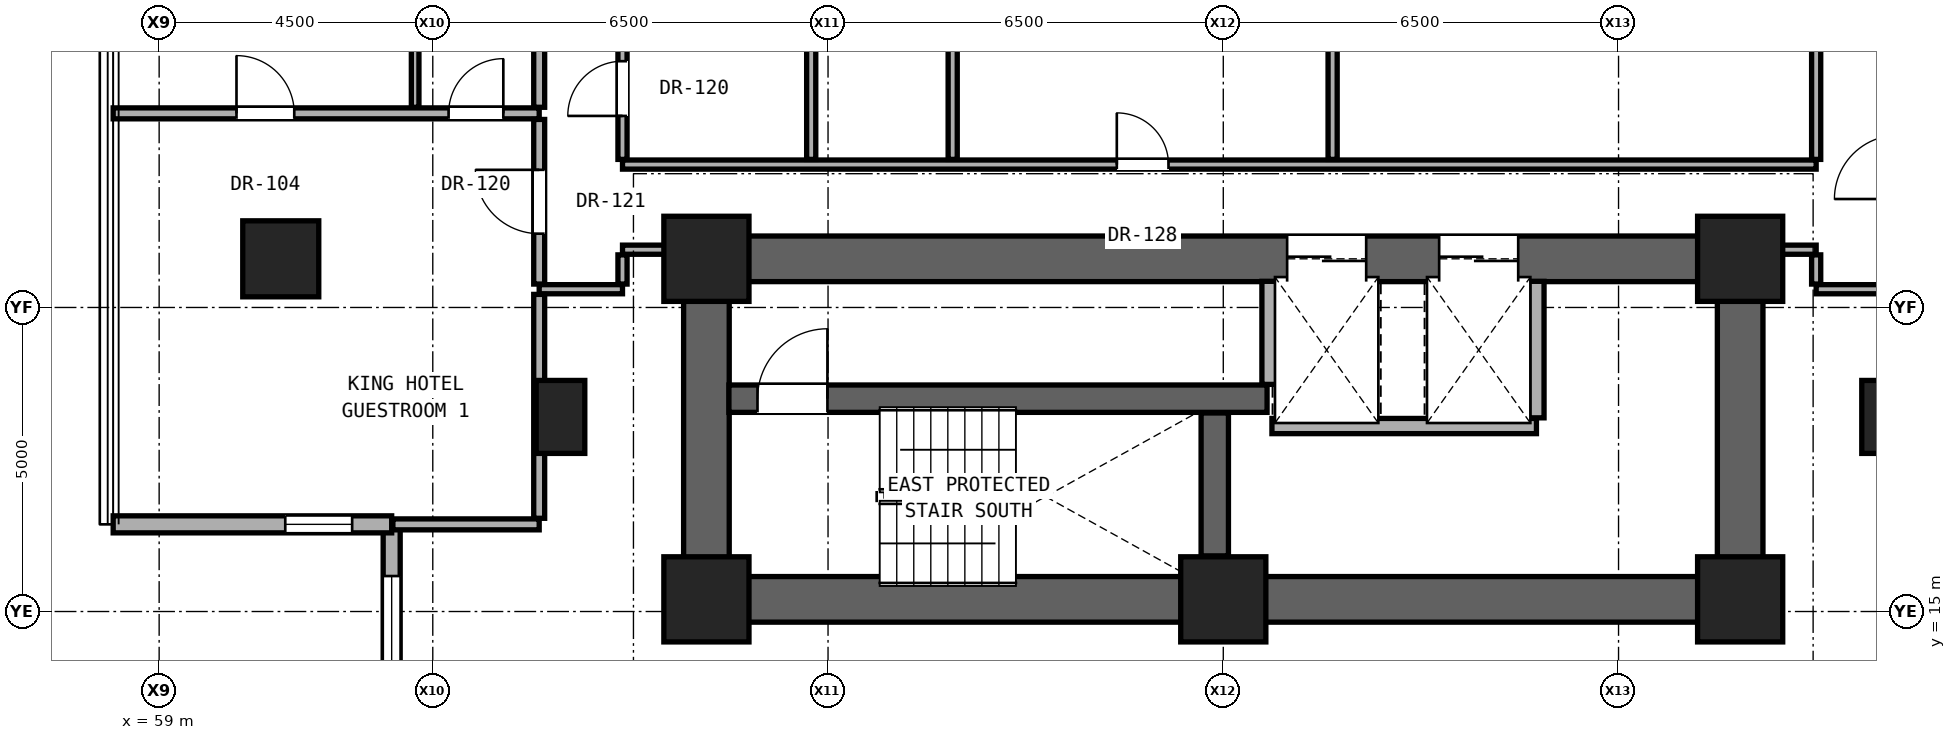
"""IFC4 building model, lengths in metres.
Left out: names, types, materials, properties, quantities, classifications, styles, units other than length and angle.
Written with IfcOpenShell. Run it as: python <this file> out.ifc"""

import sys

from ifc_helpers import new_model, si_unit, direction, frame, frame_2d, origin, origin_2d, place, context, subcontext, project, spatial, rectangle, hollow_rectangle, extrude, element, fill, save


model = new_model("IFC4")
c1 = context("Model", 3, precision=1e-05, world=origin(), true_north=direction((0.0, 1.0)))
c2 = subcontext(c1, "Body", "Model", "MODEL_VIEW")
j1 = project(units=[si_unit("LENGTHUNIT", "METRE"), si_unit("PLANEANGLEUNIT", "RADIAN")], contexts=[c1])
p1 = place(None, origin())
s1 = spatial("IfcSite", under=j1, at=p1, CompositionType="ELEMENT")
p2 = place(p1, origin())
s2 = spatial("IfcBuilding", under=s1, at=p2, CompositionType="ELEMENT")
p3 = place(p2, frame((0.0, 0.0, 29.0)))
s3 = spatial("IfcBuildingStorey", under=s2, at=p3, CompositionType="ELEMENT", Elevation=29.0)
for number, where, z_axis, x_axis in (
    (1, (68.0, 15.2, 0.0), (0.0, 0.0, 1.0), (1.0, 0.0, 0.0)),
    (2, (76.5, 15.2, 0.0), (0.0, 0.0, 1.0), (1.0, 0.0, 0.0)),
    (3, (85.0, 15.2, 0.0), (0.0, 0.0, 1.0), (1.0, 0.0, 0.0)),
    (4, (68.0, 20.8, 0.0), (0.0, 0.0, 1.0), (1.0, 0.0, 0.0)),
    (5, (85.0, 20.8, 0.0), (0.0, 0.0, 1.0), (1.0, 0.0, 0.0)),
):
    element("IfcColumn", number, at=place(p3, frame(where, z_axis=z_axis, x_axis=x_axis)), inside=s3, PredefinedType="COLUMN", context=c2, shape_type="SweptSolid", body=[
        extrude(rectangle(XDim=1.4, YDim=1.4, at=origin_2d()), origin(), (0.0, 0.0, 1.0), 3.3),
    ])
p4 = place(p3, frame((61.0, 20.8, 0.0), z_axis=(0.0, 0.0, 1.0), x_axis=(1.0, 0.0, 0.0)))
e6 = element("IfcColumn", 6, at=p4, inside=s3, PredefinedType="COLUMN", context=c2, shape_type="SweptSolid", body=[
    extrude(hollow_rectangle(XDim=1.25, YDim=1.25, WallThickness=0.07, at=origin_2d()), origin(), (0.0, 0.0, 1.0), 3.3),
])
for number, where, z_axis, x_axis in (
    (7, (65.6, 18.2, 0.0), (0.0, 0.0, 1.0), (1.0, 0.0, 0.0)),
    (8, (87.4, 18.2, 0.0), (0.0, 0.0, 1.0), (1.0, 0.0, 0.0)),
):
    element("IfcColumn", number, at=place(p3, frame(where, z_axis=z_axis, x_axis=x_axis)), inside=s3, PredefinedType="PILASTER", context=c2, shape_type="SweptSolid", body=[
        extrude(rectangle(XDim=0.8, YDim=1.2, at=origin_2d()), origin(), (0.0, 0.0, 1.0), 3.3),
    ])
p5 = place(p3, frame((68.0, 15.2, 0.0), z_axis=(0.0, 0.0, 1.0), x_axis=(1.0, 0.0, 0.0)))
e9 = element("IfcWall", 9, at=p5, inside=s3, PredefinedType="SHEAR", context=c2, shape_type="SweptSolid", body=[
    extrude(rectangle(XDim=17.0, YDim=0.75, at=frame_2d((8.5, 0.0))), origin(), (0.0, 0.0, 1.0), 3.06),
])
for number, where, z_axis, x_axis in (
    (10, (68.0, 15.2, 0.0), (0.0, 0.0, 1.0), (0.0, 1.0, 0.0)),
    (11, (85.0, 15.2, 0.0), (0.0, 0.0, 1.0), (0.0, 1.0, 0.0)),
):
    element("IfcWall", number, at=place(p3, frame(where, z_axis=z_axis, x_axis=x_axis)), inside=s3, PredefinedType="SHEAR", context=c2, shape_type="SweptSolid", body=[
        extrude(rectangle(XDim=5.6, YDim=0.75, at=frame_2d((2.8, 0.0))), origin(), (0.0, 0.0, 1.0), 3.06),
    ])
p6 = place(p3, frame((68.0, 20.8, 0.0), z_axis=(0.0, 0.0, 1.0), x_axis=(1.0, 0.0, 0.0)))
e12 = element("IfcWall", 12, at=p6, inside=s3, PredefinedType="SHEAR", context=c2, shape_type="SweptSolid", body=[
    extrude(rectangle(XDim=17.0, YDim=0.75, at=frame_2d((8.5, 0.0))), origin(), (0.0, 0.0, 1.0), 3.06),
])
p7 = place(p6, frame((9.55, 0.0, 0.0)))
e13 = element("IfcOpeningElement", 13, at=p7, cuts=e12, PredefinedType="OPENING", context=c2, shape_type="SweptSolid", body=[
    extrude(rectangle(XDim=1.3, YDim=2.3, at=frame_2d((0.65, 1.15))), frame((0.0, 0.385, 0.0), z_axis=(0.0, -1.0, 0.0), x_axis=(1.0, 0.0, 0.0)), (0.0, 0.0, 1.0), 0.77),
])
p8 = place(p6, frame((12.05, 0.0, 0.0)))
e14 = element("IfcOpeningElement", 14, at=p8, cuts=e12, PredefinedType="OPENING", context=c2, shape_type="SweptSolid", body=[
    extrude(rectangle(XDim=1.3, YDim=2.3, at=frame_2d((0.65, 1.15))), frame((0.0, 0.385, 0.0), z_axis=(0.0, -1.0, 0.0), x_axis=(1.0, 0.0, 0.0)), (0.0, 0.0, 1.0), 0.77),
])
p9 = place(p3, frame((62.824, 16.433, 0.0), z_axis=(0.0, 0.0, 1.0), x_axis=(0.0, -1.0, 0.0)))
e15 = element("IfcWall", 15, at=p9, inside=s3, PredefinedType="SOLIDWALL", context=c2, shape_type="SweptSolid", body=[
    extrude(rectangle(XDim=4.58, YDim=0.28, at=frame_2d((2.29, 0.0))), origin(), (0.0, 0.0, 1.0), 3.04),
])
p10 = place(p9, frame((0.85, 0.0, 0.79)))
e16 = element("IfcOpeningElement", 16, at=p10, cuts=e15, PredefinedType="OPENING", context=c2, shape_type="SweptSolid", body=[
    extrude(rectangle(XDim=1.5, YDim=2.1, at=frame_2d((0.75, 1.05))), frame((0.0, 0.15, 0.0), z_axis=(0.0, -1.0, 0.0), x_axis=(1.0, 0.0, 0.0)), (0.0, 0.0, 1.0), 0.3),
])
p11 = place(p3, frame((58.244, 16.433, 0.0), z_axis=(0.0, 0.0, 1.0), x_axis=(1.0, 0.0, 0.0)))
e17 = element("IfcWall", 17, at=p11, inside=s3, PredefinedType="SOLIDWALL", context=c2, shape_type="SweptSolid", body=[
    extrude(rectangle(XDim=4.58, YDim=0.28, at=frame_2d((2.29, 0.0))), origin(), (0.0, 0.0, 1.0), 3.04),
])
p12 = place(p11, frame((2.83, 0.0, 0.85)))
e18 = element("IfcOpeningElement", 18, at=p12, cuts=e17, PredefinedType="OPENING", context=c2, shape_type="SweptSolid", body=[
    extrude(rectangle(XDim=1.1, YDim=2.0, at=frame_2d((0.55, 1.0))), frame((0.0, 0.15, 0.0), z_axis=(0.0, -1.0, 0.0), x_axis=(1.0, 0.0, 0.0)), (0.0, 0.0, 1.0), 0.3),
])
p13 = place(p3, frame((62.844, 16.433, 0.0), z_axis=(0.0, 0.0, 1.0), x_axis=(1.0, 0.0, 0.0)))
e19 = element("IfcWall", 19, at=p13, inside=s3, PredefinedType="PARTITIONING", context=c2, shape_type="SweptSolid", body=[
    extrude(rectangle(XDim=2.406, YDim=0.18, at=frame_2d((1.203, 0.0))), origin(), (0.0, 0.0, 1.0), 3.06),
])
p14 = place(p3, frame((77.3, 18.05, 0.0), z_axis=(0.0, 0.0, 1.0), x_axis=(1.0, 0.0, 0.0)))
e20 = element("IfcWall", 20, at=p14, inside=s3, PredefinedType="SOLIDWALL", context=c2, shape_type="SweptSolid", body=[
    extrude(rectangle(XDim=4.35, YDim=0.25, at=frame_2d((2.175, 0.0))), origin(), (0.0, 0.0, 1.0), 3.06),
])
p15 = place(p3, frame((68.37, 18.5, 0.0), z_axis=(0.0, 0.0, 1.0), x_axis=(1.0, 0.0, 0.0)))
e21 = element("IfcWall", 21, at=p15, inside=s3, PredefinedType="SHEAR", context=c2, shape_type="SweptSolid", body=[
    extrude(rectangle(XDim=8.85, YDim=0.45, at=frame_2d((4.425, 0.0))), origin(), (0.0, 0.0, 1.0), 3.06),
])
p16 = place(p15, frame((0.47, 0.0, 0.0)))
e22 = element("IfcOpeningElement", 22, at=p16, cuts=e21, PredefinedType="OPENING", context=c2, shape_type="SweptSolid", body=[
    extrude(rectangle(XDim=1.15, YDim=2.2, at=frame_2d((0.575, 1.1))), frame((0.0, 0.235, 0.0), z_axis=(0.0, -1.0, 0.0), x_axis=(1.0, 0.0, 0.0)), (0.0, 0.0, 1.0), 0.47),
])
p17 = place(p3, frame((65.25, 20.3, 0.0), z_axis=(0.0, 0.0, 1.0), x_axis=(1.0, 0.0, 0.0)))
e23 = element("IfcWall", 23, at=p17, inside=s3, PredefinedType="PARTITIONING", context=c2, shape_type="SweptSolid", body=[
    extrude(rectangle(XDim=1.37, YDim=0.15, at=frame_2d((0.685, 0.0))), origin(), (0.0, 0.0, 1.0), 3.06),
])
p18 = place(p3, frame((86.25, 20.3, 0.0), z_axis=(0.0, 0.0, 1.0), x_axis=(1.0, 0.0, 0.0)))
e24 = element("IfcWall", 24, at=p18, inside=s3, PredefinedType="PARTITIONING", context=c2, shape_type="SweptSolid", body=[
    extrude(rectangle(XDim=1.35, YDim=0.15, at=frame_2d((0.675, 0.0))), origin(), (0.0, 0.0, 1.0), 3.06),
])
p19 = place(p3, frame((66.62, 20.95, 0.0), z_axis=(0.0, 0.0, 1.0), x_axis=(1.0, 0.0, 0.0)))
e25 = element("IfcWall", 25, at=p19, inside=s3, PredefinedType="PARTITIONING", context=c2, shape_type="SweptSolid", body=[
    extrude(rectangle(XDim=1.01, YDim=0.15, at=frame_2d((0.505, 0.0))), origin(), (0.0, 0.0, 1.0), 2.452),
])
p20 = place(p3, frame((85.37, 20.95, 0.0), z_axis=(0.0, 0.0, 1.0), x_axis=(1.0, 0.0, 0.0)))
e26 = element("IfcWall", 26, at=p20, inside=s3, PredefinedType="PARTITIONING", context=c2, shape_type="SweptSolid", body=[
    extrude(rectangle(XDim=0.88, YDim=0.15, at=frame_2d((0.44, 0.0))), origin(), (0.0, 0.0, 1.0), 2.452),
])
p21 = place(p3, frame((66.62, 22.35, 0.0), z_axis=(0.0, 0.0, 1.0), x_axis=(1.0, 0.0, 0.0)))
e27 = element("IfcWall", 27, at=p21, inside=s3, PredefinedType="PARTITIONING", context=c2, shape_type="SweptSolid", body=[
    extrude(rectangle(XDim=19.63, YDim=0.15, at=frame_2d((9.815, 0.0))), origin(), (0.0, 0.0, 1.0), 2.125),
])
p22 = place(p21, frame((8.129, 0.0, 0.0)))
e28 = element("IfcOpeningElement", 28, at=p22, cuts=e27, PredefinedType="OPENING", context=c2, shape_type="SweptSolid", body=[
    extrude(rectangle(XDim=0.85, YDim=2.01, at=frame_2d((0.425, 1.005))), frame((0.0, 0.085, 0.0), z_axis=(0.0, -1.0, 0.0), x_axis=(1.0, 0.0, 0.0)), (0.0, 0.0, 1.0), 0.17),
])
p23 = place(p3, frame((58.244, 23.192, 0.0), z_axis=(0.0, 0.0, 1.0), x_axis=(1.0, 0.0, 0.0)))
e29 = element("IfcWall", 29, at=p23, inside=s3, PredefinedType="PARTITIONING", context=c2, shape_type="SweptSolid", body=[
    extrude(rectangle(XDim=7.006, YDim=0.18, at=frame_2d((3.503, 0.0))), origin(), (0.0, 0.0, 1.0), 2.196),
])
p24 = place(p23, frame((2.028, 0.0, 0.0)))
e30 = element("IfcOpeningElement", 30, at=p24, cuts=e29, PredefinedType="OPENING", context=c2, shape_type="SweptSolid", body=[
    extrude(rectangle(XDim=0.95, YDim=2.15, at=frame_2d((0.475, 1.075))), frame((0.0, 0.1, 0.0), z_axis=(0.0, -1.0, 0.0), x_axis=(1.0, 0.0, 0.0)), (0.0, 0.0, 1.0), 0.2),
])
p25 = place(p23, frame((5.516, 0.0, 0.0)))
e31 = element("IfcOpeningElement", 31, at=p25, cuts=e29, PredefinedType="OPENING", context=c2, shape_type="SweptSolid", body=[
    extrude(rectangle(XDim=0.9, YDim=2.1, at=frame_2d((0.45, 1.05))), frame((0.0, 0.1, 0.0), z_axis=(0.0, -1.0, 0.0), x_axis=(1.0, 0.0, 0.0)), (0.0, 0.0, 1.0), 0.2),
])
p26 = place(p3, frame((63.21, 23.292, 0.0), z_axis=(0.0, 0.0, 1.0), x_axis=(0.0, 1.0, 0.0)))
e32 = element("IfcWall", 32, at=p26, inside=s3, PredefinedType="PARTITIONING", context=c2, shape_type="SweptSolid", body=[
    extrude(rectangle(XDim=2.127, YDim=0.125, at=frame_2d((1.064, 0.0))), origin(), (0.0, 0.0, 1.0), 3.06),
])
p27 = place(p3, frame((65.25, 16.533, 0.0), z_axis=(0.0, 0.0, 1.0), x_axis=(0.0, 1.0, 0.0)))
e33 = element("IfcWall", 33, at=p27, inside=s3, PredefinedType="PARTITIONING", context=c2, shape_type="SweptSolid", body=[
    extrude(rectangle(XDim=3.682, YDim=0.18, at=frame_2d((1.841, 0.0))), origin(), (0.0, 0.0, 1.0), 2.436),
])
p28 = place(p3, frame((65.25, 20.385, 0.0), z_axis=(0.0, 0.0, 1.0), x_axis=(0.0, 1.0, 0.0)))
e34 = element("IfcWall", 34, at=p28, inside=s3, PredefinedType="PARTITIONING", context=c2, shape_type="SweptSolid", body=[
    extrude(rectangle(XDim=2.707, YDim=0.18, at=frame_2d((1.354, 0.0))), origin(), (0.0, 0.0, 1.0), 2.452),
])
p29 = place(p28, frame((0.829, 0.0, 0.0)))
e35 = element("IfcOpeningElement", 35, at=p29, cuts=e34, PredefinedType="OPENING", context=c2, shape_type="SweptSolid", body=[
    extrude(rectangle(XDim=1.05, YDim=2.2, at=frame_2d((0.525, 1.1))), frame((0.0, 0.1, 0.0), z_axis=(0.0, -1.0, 0.0), x_axis=(1.0, 0.0, 0.0)), (0.0, 0.0, 1.0), 0.2),
])
p30 = place(p3, frame((65.25, 23.292, 0.0), z_axis=(0.0, 0.0, 1.0), x_axis=(0.0, 1.0, 0.0)))
e36 = element("IfcWall", 36, at=p30, inside=s3, PredefinedType="PARTITIONING", context=c2, shape_type="SweptSolid", body=[
    extrude(rectangle(XDim=2.127, YDim=0.18, at=frame_2d((1.064, 0.0))), origin(), (0.0, 0.0, 1.0), 3.06),
])
p31 = place(p3, frame((66.62, 20.385, 0.0), z_axis=(0.0, 0.0, 1.0), x_axis=(0.0, 1.0, 0.0)))
e37 = element("IfcWall", 37, at=p31, inside=s3, PredefinedType="PARTITIONING", context=c2, shape_type="SweptSolid", body=[
    extrude(rectangle(XDim=0.48, YDim=0.15, at=frame_2d((0.24, 0.0))), origin(), (0.0, 0.0, 1.0), 2.452),
])
p32 = place(p3, frame((66.62, 22.435, 0.0), z_axis=(0.0, 0.0, 1.0), x_axis=(0.0, 1.0, 0.0)))
e38 = element("IfcWall", 38, at=p32, inside=s3, PredefinedType="PARTITIONING", context=c2, shape_type="SweptSolid", body=[
    extrude(rectangle(XDim=2.33, YDim=0.15, at=frame_2d((1.165, 0.0))), origin(), (0.0, 0.0, 1.0), 3.06),
])
p33 = place(p32, frame((0.715, 0.0, 0.0)))
e39 = element("IfcOpeningElement", 39, at=p33, cuts=e38, PredefinedType="OPENING", context=c2, shape_type="SweptSolid", body=[
    extrude(rectangle(XDim=0.9, YDim=2.1, at=frame_2d((0.45, 1.05))), frame((0.0, 0.085, 0.0), z_axis=(0.0, -1.0, 0.0), x_axis=(1.0, 0.0, 0.0)), (0.0, 0.0, 1.0), 0.17),
])
p34 = place(p3, frame((69.723, 22.435, 0.0), z_axis=(0.0, 0.0, 1.0), x_axis=(0.0, 1.0, 0.0)))
e40 = element("IfcWall", 40, at=p34, inside=s3, PredefinedType="PARTITIONING", context=c2, shape_type="SweptSolid", body=[
    extrude(rectangle(XDim=2.33, YDim=0.15, at=frame_2d((1.165, 0.0))), origin(), (0.0, 0.0, 1.0), 3.06),
])
p35 = place(p3, frame((72.05, 22.435, 0.0), z_axis=(0.0, 0.0, 1.0), x_axis=(0.0, 1.0, 0.0)))
e41 = element("IfcWall", 41, at=p35, inside=s3, PredefinedType="PARTITIONING", context=c2, shape_type="SweptSolid", body=[
    extrude(rectangle(XDim=8.13, YDim=0.15, at=frame_2d((4.065, 0.0))), origin(), (0.0, 0.0, 1.0), 2.125),
])
p36 = place(p3, frame((76.36, 15.915, 0.0), z_axis=(0.0, 0.0, 1.0), x_axis=(0.0, 1.0, 0.0)))
e42 = element("IfcWall", 42, at=p36, inside=s3, PredefinedType="SHEAR", context=c2, shape_type="SweptSolid", body=[
    extrude(rectangle(XDim=2.35, YDim=0.45, at=frame_2d((1.175, 0.0))), origin(), (0.0, 0.0, 1.0), 3.06),
])
p37 = place(p3, frame((77.26, 18.735, 0.0), z_axis=(0.0, 0.0, 1.0), x_axis=(0.0, 1.0, 0.0)))
e43 = element("IfcWall", 43, at=p37, inside=s3, PredefinedType="SOLIDWALL", context=c2, shape_type="SweptSolid", body=[
    extrude(rectangle(XDim=1.695, YDim=0.25, at=frame_2d((0.847, 0.0))), origin(), (0.0, 0.0, 1.0), 3.06),
])
p38 = place(p3, frame((78.298, 22.435, 0.0), z_axis=(0.0, 0.0, 1.0), x_axis=(0.0, 1.0, 0.0)))
e44 = element("IfcWall", 44, at=p38, inside=s3, PredefinedType="PARTITIONING", context=c2, shape_type="SweptSolid", body=[
    extrude(rectangle(XDim=8.13, YDim=0.15, at=frame_2d((4.065, 0.0))), origin(), (0.0, 0.0, 1.0), 2.125),
])
p39 = place(p3, frame((81.65, 18.185, 0.0), z_axis=(0.0, 0.0, 1.0), x_axis=(0.0, 1.0, 0.0)))
e45 = element("IfcWall", 45, at=p39, inside=s3, PredefinedType="SOLIDWALL", context=c2, shape_type="SweptSolid", body=[
    extrude(rectangle(XDim=2.245, YDim=0.25, at=frame_2d((1.123, 0.0))), origin(), (0.0, 0.0, 1.0), 3.06),
])
p40 = place(p3, frame((86.25, 20.385, 0.0), z_axis=(0.0, 0.0, 1.0), x_axis=(0.0, 1.0, 0.0)))
e46 = element("IfcWall", 46, at=p40, inside=s3, PredefinedType="PARTITIONING", context=c2, shape_type="SweptSolid", body=[
    extrude(rectangle(XDim=0.48, YDim=0.15, at=frame_2d((0.24, 0.0))), origin(), (0.0, 0.0, 1.0), 2.452),
])
p41 = place(p3, frame((86.25, 22.435, 0.0), z_axis=(0.0, 0.0, 1.0), x_axis=(0.0, 1.0, 0.0)))
e47 = element("IfcWall", 47, at=p41, inside=s3, PredefinedType="PARTITIONING", context=c2, shape_type="SweptSolid", body=[
    extrude(rectangle(XDim=8.13, YDim=0.15, at=frame_2d((4.065, 0.0))), origin(), (0.0, 0.0, 1.0), 2.279),
])
p42 = place(p10, origin())
e48 = element("IfcWindow", 48, at=p42, inside=s3, PartitioningType="SINGLE_PANEL", PredefinedType="WINDOW", context=c2, shape_type="SweptSolid", body=[
    extrude(rectangle(XDim=1.5, YDim=2.1, at=frame_2d((0.75, 1.05))), frame((0.0, 0.03, 0.0), z_axis=(0.0, -1.0, 0.0), x_axis=(1.0, 0.0, 0.0)), (0.0, 0.0, 1.0), 0.06),
])
fill(e16, e48)
p43 = place(p12, origin())
e49 = element("IfcWindow", 49, at=p43, inside=s3, PartitioningType="SINGLE_PANEL", PredefinedType="WINDOW", context=c2, shape_type="SweptSolid", body=[
    extrude(rectangle(XDim=1.1, YDim=2.0, at=frame_2d((0.55, 1.0))), frame((0.0, 0.03, 0.0), z_axis=(0.0, -1.0, 0.0), x_axis=(1.0, 0.0, 0.0)), (0.0, 0.0, 1.0), 0.06),
])
fill(e18, e49)
p44 = place(p16, origin())
e50 = element("IfcDoor", 50, at=p44, inside=s3, OperationType="SINGLE_SWING_RIGHT", PredefinedType="DOOR", context=c2, shape_type="SweptSolid", body=[
    extrude(rectangle(XDim=1.15, YDim=2.2, at=frame_2d((0.575, 1.1))), frame((0.0, 0.025, 0.0), z_axis=(0.0, -1.0, 0.0), x_axis=(1.0, 0.0, 0.0)), (0.0, 0.0, 1.0), 0.05),
])
fill(e22, e50)
p45 = place(p33, origin())
e51 = element("IfcDoor", 51, at=p45, inside=s3, OperationType="SINGLE_SWING_LEFT", PredefinedType="DOOR", context=c2, shape_type="SweptSolid", body=[
    extrude(rectangle(XDim=0.9, YDim=2.1, at=frame_2d((0.45, 1.05))), frame((0.0, 0.025, 0.0), z_axis=(0.0, -1.0, 0.0), x_axis=(1.0, 0.0, 0.0)), (0.0, 0.0, 1.0), 0.05),
])
fill(e39, e51)
p46 = place(p29, origin())
e52 = element("IfcDoor", 52, at=p46, inside=s3, OperationType="SINGLE_SWING_RIGHT", PredefinedType="DOOR", context=c2, shape_type="SweptSolid", body=[
    extrude(rectangle(XDim=1.05, YDim=2.2, at=frame_2d((0.525, 1.1))), frame((0.0, 0.025, 0.0), z_axis=(0.0, -1.0, 0.0), x_axis=(1.0, 0.0, 0.0)), (0.0, 0.0, 1.0), 0.05),
])
fill(e35, e52)
p47 = place(p24, origin())
e53 = element("IfcDoor", 53, at=p47, inside=s3, OperationType="SINGLE_SWING_LEFT", PredefinedType="DOOR", context=c2, shape_type="SweptSolid", body=[
    extrude(rectangle(XDim=0.95, YDim=2.15, at=frame_2d((0.475, 1.075))), frame((0.0, 0.025, 0.0), z_axis=(0.0, -1.0, 0.0), x_axis=(1.0, 0.0, 0.0)), (0.0, 0.0, 1.0), 0.05),
])
fill(e30, e53)
p48 = place(p25, origin())
e54 = element("IfcDoor", 54, at=p48, inside=s3, OperationType="SINGLE_SWING_RIGHT", PredefinedType="DOOR", context=c2, shape_type="SweptSolid", body=[
    extrude(rectangle(XDim=0.9, YDim=2.1, at=frame_2d((0.45, 1.05))), frame((0.0, 0.025, 0.0), z_axis=(0.0, -1.0, 0.0), x_axis=(1.0, 0.0, 0.0)), (0.0, 0.0, 1.0), 0.05),
])
fill(e31, e54)
p49 = place(p22, origin())
e55 = element("IfcDoor", 55, at=p49, inside=s3, OperationType="SINGLE_SWING_LEFT", PredefinedType="DOOR", context=c2, shape_type="SweptSolid", body=[
    extrude(rectangle(XDim=0.85, YDim=2.01, at=frame_2d((0.425, 1.005))), frame((0.0, 0.025, 0.0), z_axis=(0.0, -1.0, 0.0), x_axis=(1.0, 0.0, 0.0)), (0.0, 0.0, 1.0), 0.05),
])
fill(e28, e55)
p50 = place(p7, origin())
e56 = element("IfcDoor", 56, at=p50, inside=s3, OperationType="DOUBLE_DOOR_SLIDING", PredefinedType="DOOR", context=c2, shape_type="SweptSolid", body=[
    extrude(rectangle(XDim=1.3, YDim=2.3, at=frame_2d((0.65, 1.15))), frame((0.0, 0.025, 0.0), z_axis=(0.0, -1.0, 0.0), x_axis=(1.0, 0.0, 0.0)), (0.0, 0.0, 1.0), 0.05),
])
fill(e13, e56)
p51 = place(p8, origin())
e57 = element("IfcDoor", 57, at=p51, inside=s3, OperationType="DOUBLE_DOOR_SLIDING", PredefinedType="DOOR", context=c2, shape_type="SweptSolid", body=[
    extrude(rectangle(XDim=1.3, YDim=2.3, at=frame_2d((0.65, 1.15))), frame((0.0, 0.025, 0.0), z_axis=(0.0, -1.0, 0.0), x_axis=(1.0, 0.0, 0.0)), (0.0, 0.0, 1.0), 0.05),
])
fill(e14, e57)
save(model, sys.argv[1])
